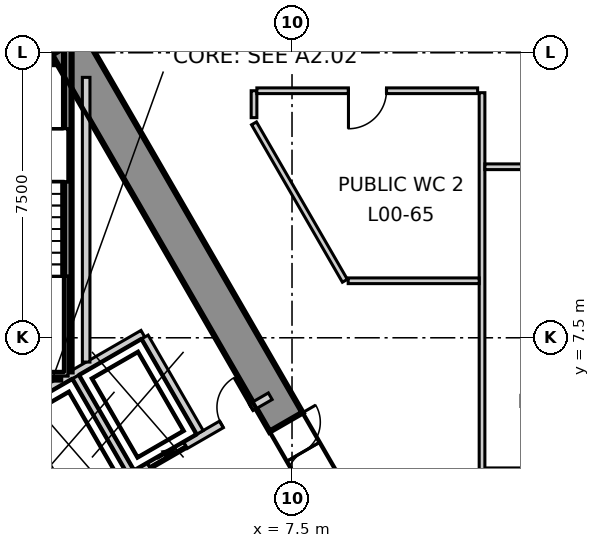
"""IFC4 building model, lengths in metres.
Left out: names, types, materials, properties, quantities, classifications, styles, units other than length and angle.
Written with IfcOpenShell. Run it as: python <this file> out.ifc"""

import sys

from ifc_helpers import new_model, si_unit, direction, frame, frame_2d, origin, place, context, subcontext, project, spatial, polyline, rectangle, outline, extrude, element, fill, save


model = new_model("IFC4")
c1 = context("Model", 3, precision=1e-05, world=origin(), true_north=direction((0.0, 1.0)))
c2 = subcontext(c1, "Body", "Model", "MODEL_VIEW")
j1 = project(units=[si_unit("LENGTHUNIT", "METRE"), si_unit("PLANEANGLEUNIT", "RADIAN")], contexts=[c1])
p1 = place(None, origin())
s1 = spatial("IfcSite", under=j1, at=p1, CompositionType="ELEMENT")
p2 = place(p1, origin())
s2 = spatial("IfcBuilding", under=s1, at=p2, CompositionType="ELEMENT")
p3 = place(p2, origin())
s3 = spatial("IfcBuildingStorey", under=s2, at=p3, CompositionType="ELEMENT", Elevation=0.0)
p4 = place(p3, frame((1.617, 15.2, -0.4), z_axis=(0.0, 0.0, 1.0), x_axis=(-1.0, 0.0, 0.0)))
e1 = element("IfcWall", 1, at=p4, inside=s3, PredefinedType="SHEAR", context=c2, shape_type="SweptSolid", body=[
    extrude(outline(polyline([(-0.288, -0.5), (1.617, -0.5), (3.522, -0.5), (2.945, 0.5), (1.617, 0.5), (0.289, 0.5), (-0.288, -0.5)])), origin(), (0.0, 0.0, 1.0), 8.5),
])
p5 = place(p4, frame((0.917, 0.0, 0.4)))
e2 = element("IfcOpeningElement", 2, at=p5, cuts=e1, PredefinedType="OPENING", context=c2, shape_type="SweptSolid", body=[
    extrude(rectangle(XDim=1.4, YDim=2.1, at=frame_2d((0.7, 1.05))), frame((0.0, 0.51, 0.0), z_axis=(0.0, -1.0, 0.0), x_axis=(1.0, 0.0, 0.0)), (0.0, 0.0, 1.0), 1.02),
])
p6 = place(p3, frame((13.972, -6.2, -0.4), z_axis=(0.0, 0.0, 1.0), x_axis=(-0.499992141631, 0.866029940768, 0.0)))
e3 = element("IfcWall", 3, at=p6, inside=s3, PredefinedType="SHEAR", context=c2, shape_type="SweptSolid", body=[
    extrude(outline(polyline([(-0.288, -0.5), (1.657, -0.5), (3.602, -0.5), (5.547, -0.5), (7.493, -0.5), (9.438, -0.5), (11.383, -0.5), (13.328, -0.5), (15.273, -0.5), (17.218, -0.499), (19.164, -0.499), (21.109, -0.499), (23.054, -0.499), (24.999, -0.499), (24.422, 0.5), (22.566, 0.5), (20.709, 0.5), (18.853, 0.5), (16.996, 0.5), (15.14, 0.5), (13.283, 0.5), (11.427, 0.5), (9.57, 0.5), (7.714, 0.5), (5.857, 0.5), (4.001, 0.5), (2.145, 0.5), (0.288, 0.5), (-0.288, -0.5)])), origin(), (0.0, 0.0, 1.0), 8.5),
])
p7 = place(p6, frame((11.455, 0.0, 0.4)))
e4 = element("IfcOpeningElement", 4, at=p7, cuts=e3, PredefinedType="OPENING", context=c2, shape_type="SweptSolid", body=[
    extrude(rectangle(XDim=1.8, YDim=2.1, at=frame_2d((0.9, 1.05))), frame((0.0, 0.51, 0.0), z_axis=(0.0, -1.0, 0.0), x_axis=(1.0, 0.0, 0.0)), (0.0, 0.0, 1.0), 1.02),
])
p8 = place(p3, frame((12.575, 4.0, 0.0), z_axis=(0.0, 0.0, 1.0), x_axis=(1.0, 0.0, 0.0)))
e5 = element("IfcWall", 5, at=p8, inside=s3, PredefinedType="PARTITIONING", context=c2, shape_type="SweptSolid", body=[
    extrude(rectangle(XDim=5.583, YDim=0.15, at=frame_2d((2.792, 0.0))), origin(), (0.0, 0.0, 1.0), 8.1),
])
p9 = place(p3, frame((12.5, 2.749, 0.0), z_axis=(0.0, 0.0, 1.0), x_axis=(0.0, 1.0, 0.0)))
e6 = element("IfcWall", 6, at=p9, inside=s3, PredefinedType="PARTITIONING", context=c2, shape_type="SweptSolid", body=[
    extrude(rectangle(XDim=11.2, YDim=0.15, at=frame_2d((5.6, 0.0))), origin(), (0.0, 0.0, 1.0), 8.1),
])
p10 = place(p3, frame((6.5, 13.142, 0.0), z_axis=(0.0, 0.0, 1.0), x_axis=(0.499949284443, -0.866054682445, 0.0)))
e7 = element("IfcWall", 7, at=p10, inside=s3, PredefinedType="PARTITIONING", context=c2, shape_type="SweptSolid", body=[
    extrude(rectangle(XDim=4.783, YDim=0.15, at=frame_2d((2.391, 0.0))), origin(), (0.0, 0.0, 1.0), 8.1),
])
p11 = place(p3, frame((8.978, 9.0, 0.0), z_axis=(0.0, 0.0, 1.0), x_axis=(1.0, 0.0, 0.0)))
e8 = element("IfcWall", 8, at=p11, inside=s3, PredefinedType="PARTITIONING", context=c2, shape_type="SweptSolid", body=[
    extrude(rectangle(XDim=3.447, YDim=0.15, at=frame_2d((1.724, 0.0))), origin(), (0.0, 0.0, 1.0), 8.1),
])
p12 = place(p3, frame((6.5, 13.292, 0.0), z_axis=(0.0, 0.0, 1.0), x_axis=(0.0, 1.0, 0.0)))
e9 = element("IfcWall", 9, at=p12, inside=s3, PredefinedType="PARTITIONING", context=c2, shape_type="SweptSolid", body=[
    extrude(rectangle(XDim=0.708, YDim=0.15, at=frame_2d((0.354, 0.0))), origin(), (0.0, 0.0, 1.0), 8.1),
])
p13 = place(p3, frame((6.575, 14.0, 0.0), z_axis=(0.0, 0.0, 1.0), x_axis=(1.0, 0.0, 0.0)))
e10 = element("IfcWall", 10, at=p13, inside=s3, PredefinedType="PARTITIONING", context=c2, shape_type="SweptSolid", body=[
    extrude(rectangle(XDim=5.809, YDim=0.15, at=frame_2d((2.905, 0.0))), origin(), (0.0, 0.0, 1.0), 8.1),
])
p14 = place(p13, frame((2.41, 0.0, 0.0)))
e11 = element("IfcOpeningElement", 11, at=p14, cuts=e10, PredefinedType="OPENING", context=c2, shape_type="SweptSolid", body=[
    extrude(rectangle(XDim=1.0, YDim=2.1, at=frame_2d((0.5, 1.05))), frame((0.0, 0.085, 0.0), z_axis=(0.0, -1.0, 0.0), x_axis=(1.0, 0.0, 0.0)), (0.0, 0.0, 1.0), 0.17),
])
p15 = place(p3, frame((12.575, 12.0, 0.0), z_axis=(0.0, 0.0, 1.0), x_axis=(1.0, 0.0, 0.0)))
e12 = element("IfcWall", 12, at=p15, inside=s3, PredefinedType="PARTITIONING", context=c2, shape_type="SweptSolid", body=[
    extrude(rectangle(XDim=0.964, YDim=0.15, at=frame_2d((0.482, 0.0))), origin(), (0.0, 0.0, 1.0), 8.1),
])
p16 = place(p3, frame((-0.002, 5.541, 0.0), z_axis=(0.0, 0.0, 1.0), x_axis=(0.86600155993, 0.500041296494, 0.0)))
e13 = element("IfcWall", 13, at=p16, inside=s3, PredefinedType="SOLIDWALL", context=c2, shape_type="SweptSolid", body=[
    extrude(rectangle(XDim=4.132, YDim=0.2, at=frame_2d((2.066, 0.0))), origin(), (0.0, 0.0, 1.0), 8.1),
])
p17 = place(p3, frame((0.0, 5.4, 0.0), z_axis=(0.0, 0.0, 1.0), x_axis=(0.500103862429, -0.865965430478, 0.0)))
e14 = element("IfcWall", 14, at=p17, inside=s3, PredefinedType="SOLIDWALL", context=c2, shape_type="SweptSolid", body=[
    extrude(rectangle(XDim=2.973, YDim=0.2, at=frame_2d((1.487, 0.0))), origin(), (0.0, 0.0, 1.0), 8.1),
])
p18 = place(p17, frame((0.937, 0.0, 0.0)))
e15 = element("IfcOpeningElement", 15, at=p18, cuts=e14, PredefinedType="OPENING", context=c2, shape_type="SweptSolid", body=[
    extrude(rectangle(XDim=1.1, YDim=2.1, at=frame_2d((0.55, 1.05))), frame((0.0, 0.11, 0.0), z_axis=(0.0, -1.0, 0.0), x_axis=(1.0, 0.0, 0.0)), (0.0, 0.0, 1.0), 0.22),
])
p19 = place(p3, frame((1.578, 2.874, 0.0), z_axis=(0.0, 0.0, 1.0), x_axis=(0.866055259465, 0.499948284879, 0.0)))
e16 = element("IfcWall", 16, at=p19, inside=s3, PredefinedType="SOLIDWALL", context=c2, shape_type="SweptSolid", body=[
    extrude(rectangle(XDim=6.177, YDim=0.2, at=frame_2d((3.088, 0.0))), origin(), (0.0, 0.0, 1.0), 8.1),
])
p20 = place(p19, frame((2.496, 0.0, 0.0)))
e17 = element("IfcOpeningElement", 17, at=p20, cuts=e16, PredefinedType="OPENING", context=c2, shape_type="SweptSolid", body=[
    extrude(rectangle(XDim=1.1, YDim=2.1, at=frame_2d((0.55, 1.05))), frame((0.0, 0.11, 0.0), z_axis=(0.0, -1.0, 0.0), x_axis=(1.0, 0.0, 0.0)), (0.0, 0.0, 1.0), 0.22),
])
p21 = place(p19, frame((4.696, 0.0, 0.0)))
e18 = element("IfcOpeningElement", 18, at=p21, cuts=e16, PredefinedType="OPENING", context=c2, shape_type="SweptSolid", body=[
    extrude(rectangle(XDim=0.9, YDim=2.1, at=frame_2d((0.45, 1.05))), frame((0.0, 0.11, 0.0), z_axis=(0.0, -1.0, 0.0), x_axis=(1.0, 0.0, 0.0)), (0.0, 0.0, 1.0), 0.22),
])
for number, where, z_axis, x_axis in (
    (19, (1.807, 6.47, 0.0), (0.0, 0.0, 1.0), (0.5, -0.866, 0.0)),
    (20, (3.626, 7.52, 0.0), (0.0, 0.0, 1.0), (0.5, -0.866, 0.0)),
):
    element("IfcWall", number, at=place(p3, frame(where, z_axis=z_axis, x_axis=x_axis)), inside=s3, PredefinedType="SOLIDWALL", context=c2, shape_type="SweptSolid", body=[
        extrude(rectangle(XDim=2.9, YDim=0.2, at=frame_2d((1.45, 0.0))), origin(), (0.0, 0.0, 1.0), 8.1),
    ])
p22 = place(p3, frame((2.083, 6.861, 0.0), z_axis=(0.0, 0.0, 1.0), x_axis=(0.0, 1.0, 0.0)))
e21 = element("IfcWall", 21, at=p22, inside=s3, PredefinedType="SOLIDWALL", context=c2, shape_type="SweptSolid", body=[
    extrude(rectangle(XDim=7.491, YDim=0.2, at=frame_2d((3.746, 0.0))), origin(), (0.0, 0.0, 1.0), 8.1),
])
p23 = place(p3, frame((1.6, 6.615, 0.0), z_axis=(0.0, 0.0, 1.0), x_axis=(0.0, 1.0, 0.0)))
e22 = element("IfcWall", 22, at=p23, inside=s3, PredefinedType="SOLIDWALL", context=c2, shape_type="SweptSolid", body=[
    extrude(rectangle(XDim=8.565, YDim=0.2, at=frame_2d((4.282, 0.0))), origin(), (0.0, 0.0, 1.0), 8.1),
])
p24 = place(p3, frame((-1.4, 6.5, 0.0), z_axis=(0.0, 0.0, 1.0), x_axis=(1.0, 0.0, 0.0)))
e23 = element("IfcWall", 23, at=p24, inside=s3, PredefinedType="SOLIDWALL", context=c2, shape_type="SweptSolid", body=[
    extrude(rectangle(XDim=2.8, YDim=0.2, at=frame_2d((1.4, 0.0))), origin(), (0.0, 0.0, 1.0), 8.1),
])
p25 = place(p20, origin())
e24 = element("IfcDoor", 24, at=p25, inside=s3, OperationType="SLIDING_TO_LEFT", PredefinedType="DOOR", context=c2, shape_type="SweptSolid", body=[
    extrude(rectangle(XDim=1.1, YDim=2.1, at=frame_2d((0.55, 1.05))), frame((0.0, 0.025, 0.0), z_axis=(0.0, -1.0, 0.0), x_axis=(1.0, 0.0, 0.0)), (0.0, 0.0, 1.0), 0.05),
])
fill(e17, e24)
p26 = place(p14, origin())
e25 = element("IfcDoor", 25, at=p26, inside=s3, OperationType="SINGLE_SWING_LEFT", PredefinedType="DOOR", context=c2, shape_type="SweptSolid", body=[
    extrude(rectangle(XDim=1.0, YDim=2.1, at=frame_2d((0.5, 1.05))), frame((0.0, 0.025, 0.0), z_axis=(0.0, -1.0, 0.0), x_axis=(1.0, 0.0, 0.0)), (0.0, 0.0, 1.0), 0.05),
])
fill(e11, e25)
p27 = place(p7, origin())
e26 = element("IfcDoor", 26, at=p27, inside=s3, OperationType="DOUBLE_DOOR_SINGLE_SWING", PredefinedType="DOOR", context=c2, shape_type="SweptSolid", body=[
    extrude(rectangle(XDim=1.8, YDim=2.1, at=frame_2d((0.9, 1.05))), frame((0.0, 0.025, 0.0), z_axis=(0.0, -1.0, 0.0), x_axis=(1.0, 0.0, 0.0)), (0.0, 0.0, 1.0), 0.05),
])
fill(e4, e26)
p28 = place(p21, origin())
e27 = element("IfcDoor", 27, at=p28, inside=s3, OperationType="SINGLE_SWING_LEFT", PredefinedType="DOOR", context=c2, shape_type="SweptSolid", body=[
    extrude(rectangle(XDim=0.9, YDim=2.1, at=frame_2d((0.45, 1.05))), frame((0.0, 0.025, 0.0), z_axis=(0.0, -1.0, 0.0), x_axis=(1.0, 0.0, 0.0)), (0.0, 0.0, 1.0), 0.05),
])
fill(e18, e27)
save(model, sys.argv[1])
